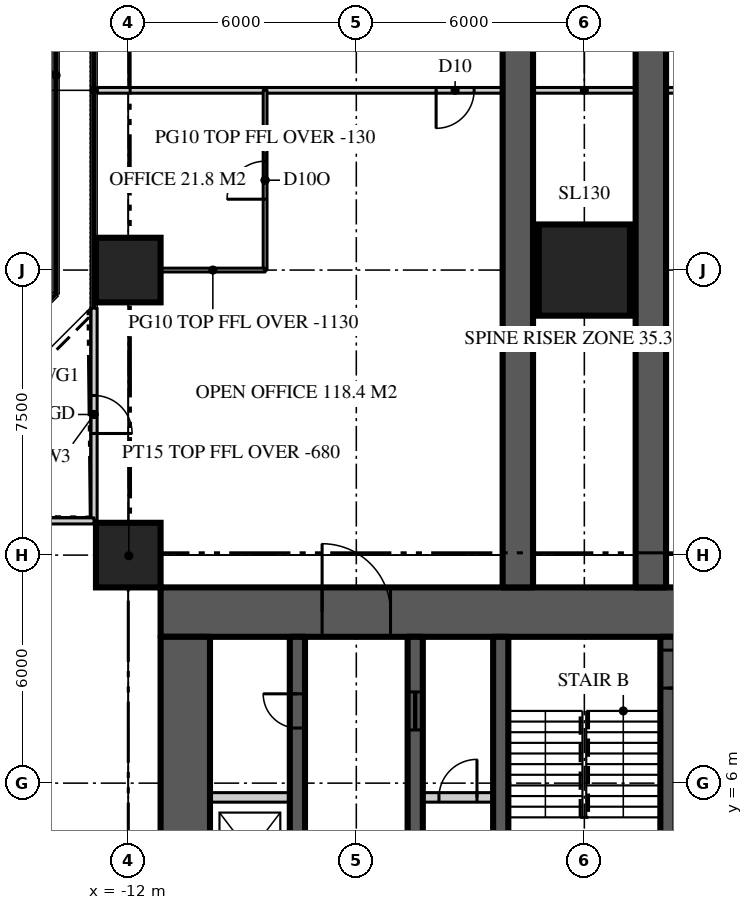
"""IFC4 building model, lengths in metres.
Left out: names, types, materials, properties, quantities, classifications, styles, units other than length and angle.
Written with IfcOpenShell. Run it as: python <this file> out.ifc"""

import sys

from ifc_helpers import new_model, si_unit, direction, frame, frame_2d, origin, origin_2d, place, context, subcontext, project, spatial, rectangle, extrude, element, fill, save


model = new_model("IFC4")
c1 = context("Model", 3, precision=1e-05, world=origin(), true_north=direction((0.0, 1.0)))
c2 = subcontext(c1, "Body", "Model", "MODEL_VIEW")
j1 = project(units=[si_unit("LENGTHUNIT", "METRE"), si_unit("PLANEANGLEUNIT", "RADIAN")], contexts=[c1])
p1 = place(None, origin())
s1 = spatial("IfcSite", under=j1, at=p1, CompositionType="ELEMENT")
p2 = place(p1, origin())
s2 = spatial("IfcBuilding", under=s1, at=p2, CompositionType="ELEMENT")
p3 = place(p2, frame((0.0, 0.0, 47.4)))
s3 = spatial("IfcBuildingStorey", under=s2, at=p3, CompositionType="ELEMENT", Elevation=47.4)
p4 = place(p3, frame((-11.15, 10.5, 0.0), z_axis=(0.0, 0.0, 1.0), x_axis=(1.0, 0.0, 0.0)))
e1 = element("IfcWall", 1, at=p4, inside=s3, PredefinedType="SHEAR", context=c2, shape_type="SweptSolid", body=[
    extrude(rectangle(XDim=22.3, YDim=1.3, at=frame_2d((11.15, 0.0))), origin(), (0.0, 0.0, 1.0), 3.9),
])
p5 = place(p4, frame((4.25, 0.0, 0.0)))
e2 = element("IfcOpeningElement", 2, at=p5, cuts=e1, PredefinedType="OPENING", context=c2, shape_type="SweptSolid", body=[
    extrude(rectangle(XDim=1.8, YDim=2.2, at=frame_2d((0.9, 1.1))), frame((0.0, 0.66, 0.0), z_axis=(0.0, -1.0, 0.0), x_axis=(1.0, 0.0, 0.0)), (0.0, 0.0, 1.0), 1.32),
])
p6 = place(p4, frame((16.25, 0.0, 0.0)))
e3 = element("IfcOpeningElement", 3, at=p6, cuts=e1, PredefinedType="OPENING", context=c2, shape_type="SweptSolid", body=[
    extrude(rectangle(XDim=1.8, YDim=2.2, at=frame_2d((0.9, 1.1))), frame((0.0, 0.66, 0.0), z_axis=(0.0, -1.0, 0.0), x_axis=(1.0, 0.0, 0.0)), (0.0, 0.0, 1.0), 1.32),
])
p7 = place(p3, frame((-10.5, 9.85, 0.0), z_axis=(0.0, 0.0, 1.0), x_axis=(0.0, -1.0, 0.0)))
e4 = element("IfcWall", 4, at=p7, inside=s3, PredefinedType="SHEAR", context=c2, shape_type="SweptSolid", body=[
    extrude(rectangle(XDim=19.7, YDim=1.3, at=frame_2d((9.85, 0.0))), origin(), (0.0, 0.0, 1.0), 3.9),
])
p8 = place(p7, frame((17.25, 0.0, 0.0)))
e5 = element("IfcOpeningElement", 5, at=p8, cuts=e4, PredefinedType="OPENING", context=c2, shape_type="SweptSolid", body=[
    extrude(rectangle(XDim=1.0, YDim=2.2, at=frame_2d((0.5, 1.1))), frame((0.0, 0.66, 0.0), z_axis=(0.0, -1.0, 0.0), x_axis=(1.0, 0.0, 0.0)), (0.0, 0.0, 1.0), 1.32),
])
for number, where, z_axis, x_axis in (
    (6, (1.75, 11.15, 0.0), (0.0, 0.0, 1.0), (0.0, 1.0, 0.0)),
    (7, (-1.75, 11.15, 0.0), (0.0, 0.0, 1.0), (0.0, 1.0, 0.0)),
):
    element("IfcWall", number, at=place(p3, frame(where, z_axis=z_axis, x_axis=x_axis)), inside=s3, PredefinedType="SHEAR", context=c2, shape_type="SweptSolid", body=[
        extrude(rectangle(XDim=15.25, YDim=0.8, at=frame_2d((7.625, 0.0))), origin(), (0.0, 0.0, 1.0), 3.9),
    ])
for number, where, z_axis, x_axis in (
    (8, (-12.0, 12.0, 0.0), (0.0, 0.0, 1.0), (1.0, 0.0, 0.0)),
    (9, (-12.0, 19.5, 0.0), (0.0, 0.0, 1.0), (1.0, 0.0, 0.0)),
):
    element("IfcColumn", number, at=place(p3, frame(where, z_axis=z_axis, x_axis=x_axis)), inside=s3, PredefinedType="COLUMN", context=c2, shape_type="SweptSolid", body=[
        extrude(rectangle(XDim=1.7, YDim=1.7, at=origin_2d()), origin(), (0.0, 0.0, 1.0), 3.9),
    ])
p9 = place(p3, frame((0.0, 19.5, 0.0), z_axis=(0.0, 0.0, 1.0), x_axis=(1.0, 0.0, 0.0)))
e10 = element("IfcColumn", 10, at=p9, inside=s3, PredefinedType="COLUMN", context=c2, shape_type="SweptSolid", body=[
    extrude(rectangle(XDim=2.4, YDim=2.4, at=origin_2d()), origin(), (0.0, 0.0, 1.0), 3.9),
])
p10 = place(p3, frame((-12.9, 18.5, 0.0), z_axis=(0.0, 0.0, 1.0), x_axis=(0.0, -1.0, 0.0)))
e11 = element("IfcWall", 11, at=p10, inside=s3, PredefinedType="SOLIDWALL", context=c2, shape_type="SweptSolid", body=[
    extrude(rectangle(XDim=5.6, YDim=0.16, at=frame_2d((2.8, 0.0))), origin(), (0.0, 0.0, 1.0), 3.77),
])
p11 = place(p10, frame((2.3, 0.0, 0.0)))
e12 = element("IfcOpeningElement", 12, at=p11, cuts=e11, PredefinedType="OPENING", context=c2, shape_type="SweptSolid", body=[
    extrude(rectangle(XDim=1.0, YDim=2.2, at=frame_2d((0.5, 1.1))), frame((0.0, 0.09, 0.0), z_axis=(0.0, -1.0, 0.0), x_axis=(1.0, 0.0, 0.0)), (0.0, 0.0, 1.0), 0.18),
])
p12 = place(p3, frame((-12.9, 12.9, 0.0), z_axis=(0.0, 0.0, 1.0), x_axis=(-1.0, 0.0, 0.0)))
e13 = element("IfcWall", 13, at=p12, inside=s3, PredefinedType="SOLIDWALL", context=c2, shape_type="SweptSolid", body=[
    extrude(rectangle(XDim=5.6, YDim=0.16, at=frame_2d((2.8, 0.0))), origin(), (0.0, 0.0, 1.0), 3.77),
])
p13 = place(p3, frame((-7.55, -9.85, 0.0), z_axis=(0.0, 0.0, 1.0), x_axis=(0.0, 1.0, 0.0)))
e14 = element("IfcWall", 14, at=p13, inside=s3, PredefinedType="SHEAR", context=c2, shape_type="SweptSolid", body=[
    extrude(rectangle(XDim=19.7, YDim=0.4, at=frame_2d((9.85, 0.0))), origin(), (0.0, 0.0, 1.0), 3.9),
])
p14 = place(p13, frame((1.45, 0.0, 0.0)))
e15 = element("IfcOpeningElement", 15, at=p14, cuts=e14, PredefinedType="OPENING", context=c2, shape_type="SweptSolid", body=[
    extrude(rectangle(XDim=1.0, YDim=2.2, at=frame_2d((0.5, 1.1))), frame((0.0, 0.21, 0.0), z_axis=(0.0, -1.0, 0.0), x_axis=(1.0, 0.0, 0.0)), (0.0, 0.0, 1.0), 0.42),
])
p15 = place(p13, frame((17.3, 0.0, 0.0)))
e16 = element("IfcOpeningElement", 16, at=p15, cuts=e14, PredefinedType="OPENING", context=c2, shape_type="SweptSolid", body=[
    extrude(rectangle(XDim=0.9, YDim=2.1, at=frame_2d((0.45, 1.05))), frame((0.0, 0.21, 0.0), z_axis=(0.0, -1.0, 0.0), x_axis=(1.0, 0.0, 0.0)), (0.0, 0.0, 1.0), 0.42),
])
p16 = place(p13, frame((5.125, 0.0, 0.0)))
e17 = element("IfcOpeningElement", 17, at=p16, cuts=e14, PredefinedType="OPENING", context=c2, shape_type="SweptSolid", body=[
    extrude(rectangle(XDim=1.1, YDim=2.2, at=frame_2d((0.55, 1.1))), frame((0.0, 0.21, 0.0), z_axis=(0.0, -1.0, 0.0), x_axis=(1.0, 0.0, 0.0)), (0.0, 0.0, 1.0), 0.42),
])
p17 = place(p13, frame((7.925, 0.0, 0.0)))
e18 = element("IfcOpeningElement", 18, at=p17, cuts=e14, PredefinedType="OPENING", context=c2, shape_type="SweptSolid", body=[
    extrude(rectangle(XDim=1.1, YDim=2.2, at=frame_2d((0.55, 1.1))), frame((0.0, 0.21, 0.0), z_axis=(0.0, -1.0, 0.0), x_axis=(1.0, 0.0, 0.0)), (0.0, 0.0, 1.0), 0.42),
])
p18 = place(p13, frame((10.675, 0.0, 0.0)))
e19 = element("IfcOpeningElement", 19, at=p18, cuts=e14, PredefinedType="OPENING", context=c2, shape_type="SweptSolid", body=[
    extrude(rectangle(XDim=1.1, YDim=2.2, at=frame_2d((0.55, 1.1))), frame((0.0, 0.21, 0.0), z_axis=(0.0, -1.0, 0.0), x_axis=(1.0, 0.0, 0.0)), (0.0, 0.0, 1.0), 0.42),
])
p19 = place(p13, frame((13.475, 0.0, 0.0)))
e20 = element("IfcOpeningElement", 20, at=p19, cuts=e14, PredefinedType="OPENING", context=c2, shape_type="SweptSolid", body=[
    extrude(rectangle(XDim=1.1, YDim=2.2, at=frame_2d((0.55, 1.1))), frame((0.0, 0.21, 0.0), z_axis=(0.0, -1.0, 0.0), x_axis=(1.0, 0.0, 0.0)), (0.0, 0.0, 1.0), 0.42),
])
p20 = place(p3, frame((-4.45, -9.85, 0.0), z_axis=(0.0, 0.0, 1.0), x_axis=(0.0, 1.0, 0.0)))
e21 = element("IfcWall", 21, at=p20, inside=s3, PredefinedType="SHEAR", context=c2, shape_type="SweptSolid", body=[
    extrude(rectangle(XDim=19.7, YDim=0.4, at=frame_2d((9.85, 0.0))), origin(), (0.0, 0.0, 1.0), 3.9),
])
p21 = place(p20, frame((1.95, 0.0, 0.0)))
e22 = element("IfcOpeningElement", 22, at=p21, cuts=e21, PredefinedType="OPENING", context=c2, shape_type="SweptSolid", body=[
    extrude(rectangle(XDim=1.0, YDim=2.2, at=frame_2d((0.5, 1.1))), frame((0.0, 0.21, 0.0), z_axis=(0.0, -1.0, 0.0), x_axis=(1.0, 0.0, 0.0)), (0.0, 0.0, 1.0), 0.42),
])
p22 = place(p20, frame((17.25, 0.0, 0.0)))
e23 = element("IfcOpeningElement", 23, at=p22, cuts=e21, PredefinedType="OPENING", context=c2, shape_type="SweptSolid", body=[
    extrude(rectangle(XDim=1.0, YDim=2.1, at=frame_2d((0.5, 1.05))), frame((0.0, 0.21, 0.0), z_axis=(0.0, -1.0, 0.0), x_axis=(1.0, 0.0, 0.0)), (0.0, 0.0, 1.0), 0.42),
])
p23 = place(p3, frame((-2.2, -9.85, 0.0), z_axis=(0.0, 0.0, 1.0), x_axis=(0.0, 1.0, 0.0)))
e24 = element("IfcWall", 24, at=p23, inside=s3, PredefinedType="SHEAR", context=c2, shape_type="SweptSolid", body=[
    extrude(rectangle(XDim=19.7, YDim=0.4, at=frame_2d((9.85, 0.0))), origin(), (0.0, 0.0, 1.0), 3.9),
])
p24 = place(p23, frame((0.35, 0.0, 0.0)))
e25 = element("IfcOpeningElement", 25, at=p24, cuts=e24, PredefinedType="OPENING", context=c2, shape_type="SweptSolid", body=[
    extrude(rectangle(XDim=1.0, YDim=2.2, at=frame_2d((0.5, 1.1))), frame((0.0, 0.21, 0.0), z_axis=(0.0, -1.0, 0.0), x_axis=(1.0, 0.0, 0.0)), (0.0, 0.0, 1.0), 0.42),
])
p25 = place(p3, frame((2.2, 9.85, 0.0), z_axis=(0.0, 0.0, 1.0), x_axis=(0.0, -1.0, 0.0)))
e26 = element("IfcWall", 26, at=p25, inside=s3, PredefinedType="SHEAR", context=c2, shape_type="SweptSolid", body=[
    extrude(rectangle(XDim=19.7, YDim=0.4, at=frame_2d((9.85, 0.0))), origin(), (0.0, 0.0, 1.0), 3.9),
])
p26 = place(p25, frame((0.35, 0.0, 0.0)))
e27 = element("IfcOpeningElement", 27, at=p26, cuts=e26, PredefinedType="OPENING", context=c2, shape_type="SweptSolid", body=[
    extrude(rectangle(XDim=1.0, YDim=2.2, at=frame_2d((0.5, 1.1))), frame((0.0, 0.21, 0.0), z_axis=(0.0, -1.0, 0.0), x_axis=(1.0, 0.0, 0.0)), (0.0, 0.0, 1.0), 0.42),
])
p27 = place(p3, frame((-9.85, 5.625, 0.0), z_axis=(0.0, 0.0, 1.0), x_axis=(1.0, 0.0, 0.0)))
e28 = element("IfcWall", 28, at=p27, inside=s3, PredefinedType="SOLIDWALL", context=c2, shape_type="SweptSolid", body=[
    extrude(rectangle(XDim=2.1, YDim=0.25, at=frame_2d((1.05, 0.0))), origin(), (0.0, 0.0, 1.0), 3.7),
])
p28 = place(p3, frame((-4.25, 5.625, 0.0), z_axis=(0.0, 0.0, 1.0), x_axis=(1.0, 0.0, 0.0)))
e29 = element("IfcWall", 29, at=p28, inside=s3, PredefinedType="SOLIDWALL", context=c2, shape_type="SweptSolid", body=[
    extrude(rectangle(XDim=1.85, YDim=0.25, at=frame_2d((0.925, 0.0))), origin(), (0.0, 0.0, 1.0), 3.7),
])
p29 = place(p28, frame((0.425, 0.0, 0.0)))
e30 = element("IfcOpeningElement", 30, at=p29, cuts=e29, PredefinedType="OPENING", context=c2, shape_type="SweptSolid", body=[
    extrude(rectangle(XDim=1.0, YDim=2.2, at=frame_2d((0.5, 1.1))), frame((0.0, 0.135, 0.0), z_axis=(0.0, -1.0, 0.0), x_axis=(1.0, 0.0, 0.0)), (0.0, 0.0, 1.0), 0.27),
])
p30 = place(p3, frame((12.82, 24.229, 0.0), z_axis=(0.0, 0.0, 1.0), x_axis=(-1.0, 0.0, 0.0)))
e31 = element("IfcWall", 31, at=p30, inside=s3, PredefinedType="PARTITIONING", context=c2, shape_type="SweptSolid", body=[
    extrude(rectangle(XDim=25.64, YDim=0.15, at=frame_2d((12.82, 0.0))), origin(), (0.0, 0.0, 1.0), 3.77),
])
p31 = place(p30, frame((15.72, 0.0, 0.0)))
e32 = element("IfcOpeningElement", 32, at=p31, cuts=e31, PredefinedType="OPENING", context=c2, shape_type="SweptSolid", body=[
    extrude(rectangle(XDim=1.0, YDim=2.2, at=frame_2d((0.5, 1.1))), frame((0.0, 0.085, 0.0), z_axis=(0.0, -1.0, 0.0), x_axis=(1.0, 0.0, 0.0)), (0.0, 0.0, 1.0), 0.17),
])
p32 = place(p30, frame((8.92, 0.0, 0.0)))
e33 = element("IfcOpeningElement", 33, at=p32, cuts=e31, PredefinedType="OPENING", context=c2, shape_type="SweptSolid", body=[
    extrude(rectangle(XDim=1.0, YDim=2.2, at=frame_2d((0.5, 1.1))), frame((0.0, 0.085, 0.0), z_axis=(0.0, -1.0, 0.0), x_axis=(1.0, 0.0, 0.0)), (0.0, 0.0, 1.0), 0.17),
])
p33 = place(p3, frame((-8.4, 19.5, 0.0), z_axis=(0.0, 0.0, 1.0), x_axis=(0.0, 1.0, 0.0)))
e34 = element("IfcWall", 34, at=p33, inside=s3, PredefinedType="PARTITIONING", context=c2, shape_type="SweptSolid", body=[
    extrude(rectangle(XDim=4.729, YDim=0.1, at=frame_2d((2.365, 0.0))), origin(), (0.0, 0.0, 1.0), 3.77),
])
p34 = place(p33, frame((1.865, 0.0, 0.0)))
e35 = element("IfcOpeningElement", 35, at=p34, cuts=e34, PredefinedType="OPENING", context=c2, shape_type="SweptSolid", body=[
    extrude(rectangle(XDim=1.0, YDim=2.2, at=frame_2d((0.5, 1.1))), frame((0.0, 0.06, 0.0), z_axis=(0.0, -1.0, 0.0), x_axis=(1.0, 0.0, 0.0)), (0.0, 0.0, 1.0), 0.12),
])
p35 = place(p3, frame((-8.4, 19.5, 0.0), z_axis=(0.0, 0.0, 1.0), x_axis=(-1.0, 0.0, 0.0)))
e36 = element("IfcWall", 36, at=p35, inside=s3, PredefinedType="PARTITIONING", context=c2, shape_type="SweptSolid", body=[
    extrude(rectangle(XDim=2.75, YDim=0.1, at=frame_2d((1.375, 0.0))), origin(), (0.0, 0.0, 1.0), 2.77),
])
p36 = place(p3, frame((-11.15, 11.15, 0.0), z_axis=(0.0, 0.0, 1.0), x_axis=(-0.707106781187, 0.707106781187, 0.0)))
e37 = element("IfcWall", 37, at=p36, inside=s3, PredefinedType="PARTITIONING", context=c2, shape_type="SweptSolid", body=[
    extrude(rectangle(XDim=2.362, YDim=0.15, at=frame_2d((1.181, 0.0))), origin(), (0.0, 0.0, 1.0), 3.22),
])
p37 = place(p11, origin())
e38 = element("IfcDoor", 38, at=p37, inside=s3, OperationType="SINGLE_SWING_RIGHT", PredefinedType="DOOR", context=c2, shape_type="SweptSolid", body=[
    extrude(rectangle(XDim=1.0, YDim=2.2, at=frame_2d((0.5, 1.1))), frame((0.0, 0.025, 0.0), z_axis=(0.0, -1.0, 0.0), x_axis=(1.0, 0.0, 0.0)), (0.0, 0.0, 1.0), 0.05),
])
fill(e12, e38)
p38 = place(p5, origin())
e39 = element("IfcDoor", 39, at=p38, inside=s3, OperationType="DOUBLE_DOOR_DOUBLE_SWING", PredefinedType="DOOR", context=c2, shape_type="SweptSolid", body=[
    extrude(rectangle(XDim=1.8, YDim=2.2, at=frame_2d((0.9, 1.1))), frame((0.0, 0.025, 0.0), z_axis=(0.0, -1.0, 0.0), x_axis=(1.0, 0.0, 0.0)), (0.0, 0.0, 1.0), 0.05),
])
fill(e2, e39)
p39 = place(p26, origin())
e40 = element("IfcDoor", 40, at=p39, inside=s3, OperationType="SINGLE_SWING_RIGHT", PredefinedType="DOOR", context=c2, shape_type="SweptSolid", body=[
    extrude(rectangle(XDim=1.0, YDim=2.2, at=frame_2d((0.5, 1.1))), frame((0.0, 0.025, 0.0), z_axis=(0.0, -1.0, 0.0), x_axis=(1.0, 0.0, 0.0)), (0.0, 0.0, 1.0), 0.05),
])
fill(e27, e40)
p40 = place(p15, origin())
e41 = element("IfcDoor", 41, at=p40, inside=s3, OperationType="SINGLE_SWING_RIGHT", PredefinedType="DOOR", context=c2, shape_type="SweptSolid", body=[
    extrude(rectangle(XDim=0.9, YDim=2.1, at=frame_2d((0.45, 1.05))), frame((0.0, 0.025, 0.0), z_axis=(0.0, -1.0, 0.0), x_axis=(1.0, 0.0, 0.0)), (0.0, 0.0, 1.0), 0.05),
])
fill(e16, e41)
p41 = place(p22, origin())
e42 = element("IfcDoor", 42, at=p41, inside=s3, OperationType="SLIDING_TO_LEFT", PredefinedType="DOOR", context=c2, shape_type="SweptSolid", body=[
    extrude(rectangle(XDim=1.0, YDim=2.1, at=frame_2d((0.5, 1.05))), frame((0.0, 0.025, 0.0), z_axis=(0.0, -1.0, 0.0), x_axis=(1.0, 0.0, 0.0)), (0.0, 0.0, 1.0), 0.05),
])
fill(e23, e42)
p42 = place(p31, origin())
e43 = element("IfcDoor", 43, at=p42, inside=s3, OperationType="SINGLE_SWING_RIGHT", PredefinedType="DOOR", context=c2, shape_type="SweptSolid", body=[
    extrude(rectangle(XDim=1.0, YDim=2.2, at=frame_2d((0.5, 1.1))), frame((0.0, 0.025, 0.0), z_axis=(0.0, -1.0, 0.0), x_axis=(1.0, 0.0, 0.0)), (0.0, 0.0, 1.0), 0.05),
])
fill(e32, e43)
p43 = place(p34, origin())
e44 = element("IfcDoor", 44, at=p43, inside=s3, OperationType="SINGLE_SWING_LEFT", PredefinedType="DOOR", context=c2, shape_type="SweptSolid", body=[
    extrude(rectangle(XDim=1.0, YDim=2.2, at=frame_2d((0.5, 1.1))), frame((0.0, 0.025, 0.0), z_axis=(0.0, -1.0, 0.0), x_axis=(1.0, 0.0, 0.0)), (0.0, 0.0, 1.0), 0.05),
])
fill(e35, e44)
p44 = place(p29, origin())
e45 = element("IfcDoor", 45, at=p44, inside=s3, OperationType="SINGLE_SWING_RIGHT", PredefinedType="DOOR", context=c2, shape_type="SweptSolid", body=[
    extrude(rectangle(XDim=1.0, YDim=2.2, at=frame_2d((0.5, 1.1))), frame((0.0, 0.025, 0.0), z_axis=(0.0, -1.0, 0.0), x_axis=(1.0, 0.0, 0.0)), (0.0, 0.0, 1.0), 0.05),
])
fill(e30, e45)
save(model, sys.argv[1])
